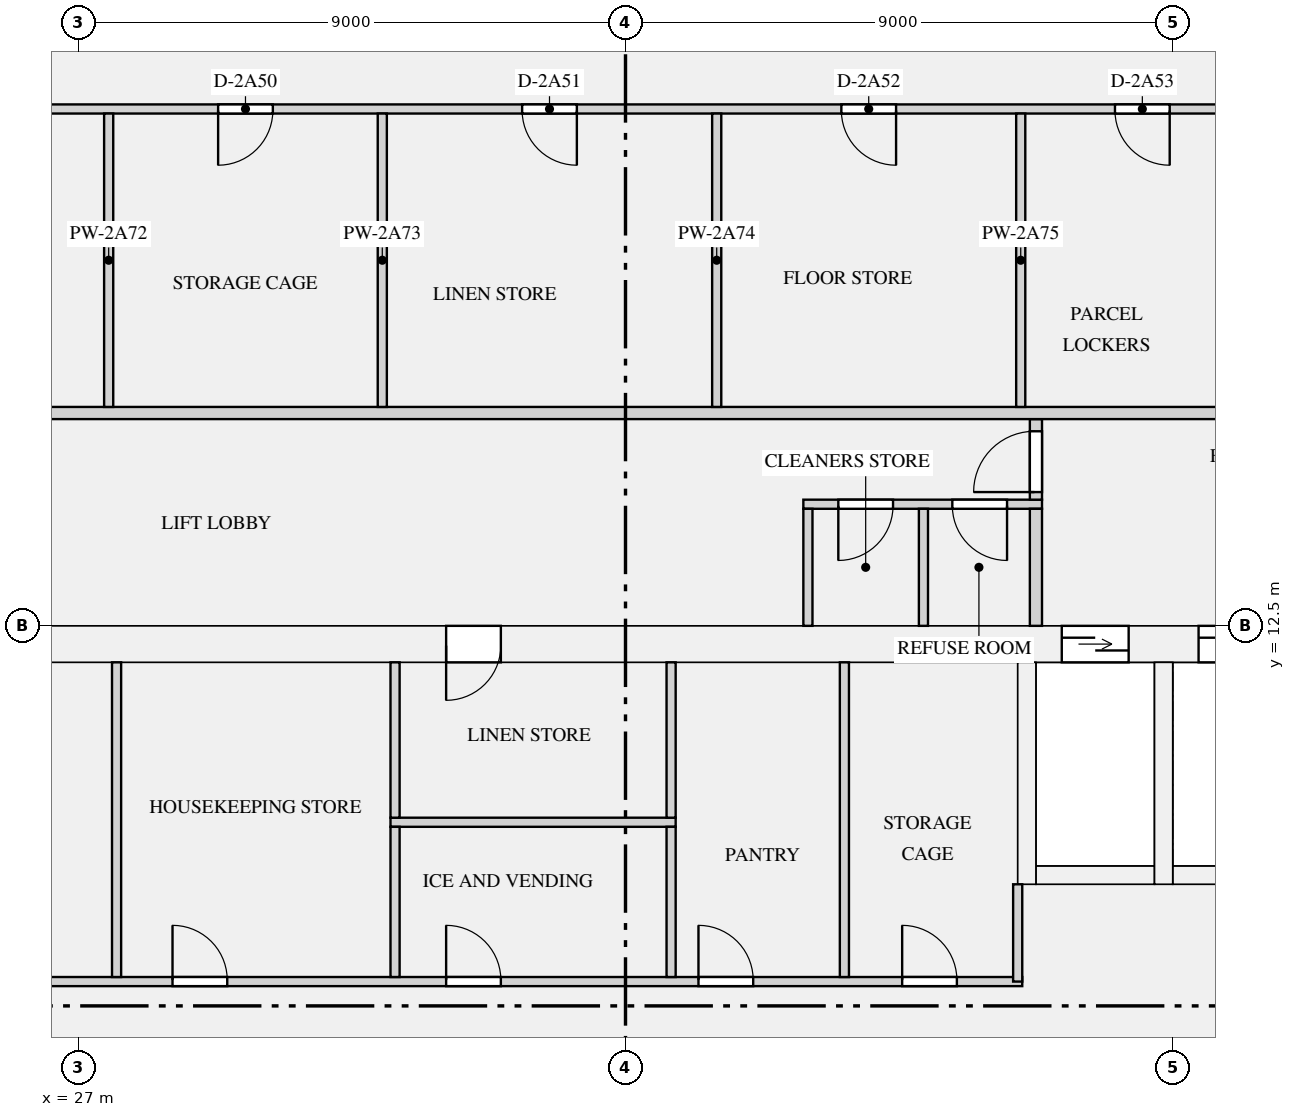
"""IFC4 building model, lengths in metres.
Left out: names, types, materials, properties, quantities, classifications, styles, units other than length and angle.
Written with IfcOpenShell. Run it as: python <this file> out.ifc"""

import sys

from ifc_helpers import new_model, si_unit, direction, frame, frame_2d, origin, place, context, subcontext, project, spatial, rectangle, extrude, element, fill, save


model = new_model("IFC4")
c1 = context("Model", 3, precision=1e-05, world=origin(), true_north=direction((0.0, 1.0)))
c2 = subcontext(c1, "Body", "Model", "MODEL_VIEW")
j1 = project(units=[si_unit("LENGTHUNIT", "METRE"), si_unit("PLANEANGLEUNIT", "RADIAN")], contexts=[c1])
p1 = place(None, origin())
s1 = spatial("IfcSite", under=j1, at=p1, CompositionType="ELEMENT")
p2 = place(p1, origin())
s2 = spatial("IfcBuilding", under=s1, at=p2, CompositionType="ELEMENT")
p3 = place(p2, frame((0.0, 0.0, 83.55)))
s3 = spatial("IfcBuildingStorey", under=s2, at=p3, CompositionType="ELEMENT", Elevation=83.55)
p4 = place(p3, frame((18.8, 12.2, 0.0), z_axis=(0.0, 0.0, 1.0), x_axis=(1.0, 0.0, 0.0)))
e1 = element("IfcWall", 1, at=p4, inside=s3, PredefinedType="SHEAR", context=c2, shape_type="SweptSolid", body=[
    extrude(rectangle(XDim=34.4, YDim=0.6, at=frame_2d((17.2, 0.0))), origin(), (0.0, 0.0, 1.0), 3.15),
])
p5 = place(p4, frame((24.375, 0.0, 0.0)))
e2 = element("IfcOpeningElement", 2, at=p5, cuts=e1, PredefinedType="OPENING", context=c2, shape_type="SweptSolid", body=[
    extrude(rectangle(XDim=1.1, YDim=2.1, at=frame_2d((0.55, 1.05))), frame((0.0, 0.31, 0.0), z_axis=(0.0, -1.0, 0.0), x_axis=(1.0, 0.0, 0.0)), (0.0, 0.0, 1.0), 0.62),
])
p6 = place(p4, frame((26.625, 0.0, 0.0)))
e3 = element("IfcOpeningElement", 3, at=p6, cuts=e1, PredefinedType="OPENING", context=c2, shape_type="SweptSolid", body=[
    extrude(rectangle(XDim=1.1, YDim=2.1, at=frame_2d((0.55, 1.05))), frame((0.0, 0.31, 0.0), z_axis=(0.0, -1.0, 0.0), x_axis=(1.0, 0.0, 0.0)), (0.0, 0.0, 1.0), 0.62),
])
p7 = place(p4, frame((28.875, 0.0, 0.0)))
e4 = element("IfcOpeningElement", 4, at=p7, cuts=e1, PredefinedType="OPENING", context=c2, shape_type="SweptSolid", body=[
    extrude(rectangle(XDim=1.1, YDim=2.1, at=frame_2d((0.55, 1.05))), frame((0.0, 0.31, 0.0), z_axis=(0.0, -1.0, 0.0), x_axis=(1.0, 0.0, 0.0)), (0.0, 0.0, 1.0), 0.62),
])
p8 = place(p4, frame((14.25, 0.0, 0.0)))
e5 = element("IfcOpeningElement", 5, at=p8, cuts=e1, PredefinedType="OPENING", context=c2, shape_type="SweptSolid", body=[
    extrude(rectangle(XDim=0.9, YDim=2.1, at=frame_2d((0.45, 1.05))), frame((0.0, 0.31, 0.0), z_axis=(0.0, -1.0, 0.0), x_axis=(1.0, 0.0, 0.0)), (0.0, 0.0, 1.0), 0.62),
])
p9 = place(p4, frame((1.35, 0.0, 0.0)))
e6 = element("IfcOpeningElement", 6, at=p9, cuts=e1, PredefinedType="OPENING", context=c2, shape_type="SweptSolid", body=[
    extrude(rectangle(XDim=1.2, YDim=2.1, at=frame_2d((0.6, 1.05))), frame((0.0, 0.31, 0.0), z_axis=(0.0, -1.0, 0.0), x_axis=(1.0, 0.0, 0.0)), (0.0, 0.0, 1.0), 0.62),
])
p10 = place(p4, frame((31.85, 0.0, 0.0)))
e7 = element("IfcOpeningElement", 7, at=p10, cuts=e1, PredefinedType="OPENING", context=c2, shape_type="SweptSolid", body=[
    extrude(rectangle(XDim=1.2, YDim=2.1, at=frame_2d((0.6, 1.05))), frame((0.0, 0.31, 0.0), z_axis=(0.0, -1.0, 0.0), x_axis=(1.0, 0.0, 0.0)), (0.0, 0.0, 1.0), 0.62),
])
p11 = place(p3, frame((42.75, 8.4, 0.0), z_axis=(0.0, 0.0, 1.0), x_axis=(1.0, 0.0, 0.0)))
e8 = element("IfcWall", 8, at=p11, inside=s3, PredefinedType="SHEAR", context=c2, shape_type="SweptSolid", body=[
    extrude(rectangle(XDim=1.95, YDim=0.3, at=frame_2d((0.975, 0.0))), origin(), (0.0, 0.0, 1.0), 3.15),
])
p12 = place(p3, frame((42.6, 8.25, 0.0), z_axis=(0.0, 0.0, 1.0), x_axis=(0.0, 1.0, 0.0)))
e9 = element("IfcWall", 9, at=p12, inside=s3, PredefinedType="SHEAR", context=c2, shape_type="SweptSolid", body=[
    extrude(rectangle(XDim=3.65, YDim=0.3, at=frame_2d((1.825, 0.0))), origin(), (0.0, 0.0, 1.0), 3.15),
])
p13 = place(p3, frame((45.0, 8.4, 0.0), z_axis=(0.0, 0.0, 1.0), x_axis=(1.0, 0.0, 0.0)))
e10 = element("IfcWall", 10, at=p13, inside=s3, PredefinedType="SHEAR", context=c2, shape_type="SweptSolid", body=[
    extrude(rectangle(XDim=1.95, YDim=0.3, at=frame_2d((0.975, 0.0))), origin(), (0.0, 0.0, 1.0), 3.15),
])
p14 = place(p3, frame((44.85, 8.25, 0.0), z_axis=(0.0, 0.0, 1.0), x_axis=(0.0, 1.0, 0.0)))
e11 = element("IfcWall", 11, at=p14, inside=s3, PredefinedType="SHEAR", context=c2, shape_type="SweptSolid", body=[
    extrude(rectangle(XDim=3.65, YDim=0.3, at=frame_2d((1.825, 0.0))), origin(), (0.0, 0.0, 1.0), 3.15),
])
p15 = place(p3, frame((22.725, 6.65, 0.0), z_axis=(0.0, 0.0, 1.0), x_axis=(1.0, 0.0, 0.0)))
e12 = element("IfcWall", 12, at=p15, inside=s3, PredefinedType="PARTITIONING", context=c2, shape_type="SweptSolid", body=[
    extrude(rectangle(XDim=19.8, YDim=0.15, at=frame_2d((9.9, 0.0))), origin(), (0.0, 0.0, 1.0), 2.83),
])
p16 = place(p15, frame((0.825, 0.0, 0.0)))
e13 = element("IfcOpeningElement", 13, at=p16, cuts=e12, PredefinedType="OPENING", context=c2, shape_type="SweptSolid", body=[
    extrude(rectangle(XDim=0.9, YDim=2.1, at=frame_2d((0.45, 1.05))), frame((0.0, 0.085, 0.0), z_axis=(0.0, -1.0, 0.0), x_axis=(1.0, 0.0, 0.0)), (0.0, 0.0, 1.0), 0.17),
])
p17 = place(p15, frame((5.825, 0.0, 0.0)))
e14 = element("IfcOpeningElement", 14, at=p17, cuts=e12, PredefinedType="OPENING", context=c2, shape_type="SweptSolid", body=[
    extrude(rectangle(XDim=0.9, YDim=2.1, at=frame_2d((0.45, 1.05))), frame((0.0, 0.085, 0.0), z_axis=(0.0, -1.0, 0.0), x_axis=(1.0, 0.0, 0.0)), (0.0, 0.0, 1.0), 0.17),
])
p18 = place(p15, frame((10.325, 0.0, 0.0)))
e15 = element("IfcOpeningElement", 15, at=p18, cuts=e12, PredefinedType="OPENING", context=c2, shape_type="SweptSolid", body=[
    extrude(rectangle(XDim=0.9, YDim=2.1, at=frame_2d((0.45, 1.05))), frame((0.0, 0.085, 0.0), z_axis=(0.0, -1.0, 0.0), x_axis=(1.0, 0.0, 0.0)), (0.0, 0.0, 1.0), 0.17),
])
p19 = place(p15, frame((14.475, 0.0, 0.0)))
e16 = element("IfcOpeningElement", 16, at=p19, cuts=e12, PredefinedType="OPENING", context=c2, shape_type="SweptSolid", body=[
    extrude(rectangle(XDim=0.9, YDim=2.1, at=frame_2d((0.45, 1.05))), frame((0.0, 0.085, 0.0), z_axis=(0.0, -1.0, 0.0), x_axis=(1.0, 0.0, 0.0)), (0.0, 0.0, 1.0), 0.17),
])
p20 = place(p15, frame((17.825, 0.0, 0.0)))
e17 = element("IfcOpeningElement", 17, at=p20, cuts=e12, PredefinedType="OPENING", context=c2, shape_type="SweptSolid", body=[
    extrude(rectangle(XDim=0.9, YDim=2.1, at=frame_2d((0.45, 1.05))), frame((0.0, 0.085, 0.0), z_axis=(0.0, -1.0, 0.0), x_axis=(1.0, 0.0, 0.0)), (0.0, 0.0, 1.0), 0.17),
])
p21 = place(p3, frame((32.135, 9.27, 0.0), z_axis=(0.0, 0.0, 1.0), x_axis=(1.0, 0.0, 0.0)))
e18 = element("IfcWall", 18, at=p21, inside=s3, PredefinedType="PARTITIONING", context=c2, shape_type="SweptSolid", body=[
    extrude(rectangle(XDim=4.69, YDim=0.15, at=frame_2d((2.345, 0.0))), origin(), (0.0, 0.0, 1.0), 2.83),
])
p22 = place(p3, frame((38.925, 14.5, 0.0), z_axis=(0.0, 0.0, 1.0), x_axis=(1.0, 0.0, 0.0)))
e19 = element("IfcWall", 19, at=p22, inside=s3, PredefinedType="PARTITIONING", context=c2, shape_type="SweptSolid", body=[
    extrude(rectangle(XDim=3.925, YDim=0.15, at=frame_2d((1.962, 0.0))), origin(), (0.0, 0.0, 1.0), 2.83),
])
p23 = place(p22, frame((0.575, 0.0, 0.0)))
e20 = element("IfcOpeningElement", 20, at=p23, cuts=e19, PredefinedType="OPENING", context=c2, shape_type="SweptSolid", body=[
    extrude(rectangle(XDim=0.9, YDim=2.1, at=frame_2d((0.45, 1.05))), frame((0.0, 0.085, 0.0), z_axis=(0.0, -1.0, 0.0), x_axis=(1.0, 0.0, 0.0)), (0.0, 0.0, 1.0), 0.17),
])
p24 = place(p22, frame((2.45, 0.0, 0.0)))
e21 = element("IfcOpeningElement", 21, at=p24, cuts=e19, PredefinedType="OPENING", context=c2, shape_type="SweptSolid", body=[
    extrude(rectangle(XDim=0.9, YDim=2.1, at=frame_2d((0.45, 1.05))), frame((0.0, 0.085, 0.0), z_axis=(0.0, -1.0, 0.0), x_axis=(1.0, 0.0, 0.0)), (0.0, 0.0, 1.0), 0.17),
])
p25 = place(p3, frame((42.45, 6.65, 0.0), z_axis=(0.0, 0.0, 1.0), x_axis=(0.0, 1.0, 0.0)))
e22 = element("IfcWall", 22, at=p25, inside=s3, PredefinedType="PARTITIONING", context=c2, shape_type="SweptSolid", body=[
    extrude(rectangle(XDim=1.6, YDim=0.15, at=frame_2d((0.8, 0.0))), origin(), (0.0, 0.0, 1.0), 2.83),
])
p26 = place(p3, frame((27.63, 6.725, 0.0), z_axis=(0.0, 0.0, 1.0), x_axis=(0.0, 1.0, 0.0)))
e23 = element("IfcWall", 23, at=p26, inside=s3, PredefinedType="PARTITIONING", context=c2, shape_type="SweptSolid", body=[
    extrude(rectangle(XDim=5.175, YDim=0.15, at=frame_2d((2.587, 0.0))), origin(), (0.0, 0.0, 1.0), 2.83),
])
for number, where, z_axis, x_axis in (
    (24, (32.21, 6.725, 0.0), (0.0, 0.0, 1.0), (0.0, 1.0, 0.0)),
    (25, (36.75, 6.725, 0.0), (0.0, 0.0, 1.0), (0.0, 1.0, 0.0)),
):
    element("IfcWall", number, at=place(p3, frame(where, z_axis=z_axis, x_axis=x_axis)), inside=s3, PredefinedType="PARTITIONING", context=c2, shape_type="SweptSolid", body=[
        extrude(rectangle(XDim=2.47, YDim=0.15, at=frame_2d((1.235, 0.0))), origin(), (0.0, 0.0, 1.0), 2.83),
    ])
p27 = place(p3, frame((39.6, 6.725, 0.0), z_axis=(0.0, 0.0, 1.0), x_axis=(0.0, 1.0, 0.0)))
e26 = element("IfcWall", 26, at=p27, inside=s3, PredefinedType="PARTITIONING", context=c2, shape_type="SweptSolid", body=[
    extrude(rectangle(XDim=5.175, YDim=0.15, at=frame_2d((2.587, 0.0))), origin(), (0.0, 0.0, 1.0), 2.83),
])
for number, where, z_axis, x_axis in (
    (27, (32.21, 9.345, 0.0), (0.0, 0.0, 1.0), (0.0, 1.0, 0.0)),
    (28, (36.75, 9.345, 0.0), (0.0, 0.0, 1.0), (0.0, 1.0, 0.0)),
):
    element("IfcWall", number, at=place(p3, frame(where, z_axis=z_axis, x_axis=x_axis)), inside=s3, PredefinedType="PARTITIONING", context=c2, shape_type="SweptSolid", body=[
        extrude(rectangle(XDim=2.555, YDim=0.15, at=frame_2d((1.277, 0.0))), origin(), (0.0, 0.0, 1.0), 2.83),
    ])
for number, where, z_axis, x_axis in (
    (29, (39.0, 12.5, 0.0), (0.0, 0.0, 1.0), (0.0, 1.0, 0.0)),
    (30, (40.9, 12.5, 0.0), (0.0, 0.0, 1.0), (0.0, 1.0, 0.0)),
):
    element("IfcWall", number, at=place(p3, frame(where, z_axis=z_axis, x_axis=x_axis)), inside=s3, PredefinedType="PARTITIONING", context=c2, shape_type="SweptSolid", body=[
        extrude(rectangle(XDim=1.925, YDim=0.15, at=frame_2d((0.962, 0.0))), origin(), (0.0, 0.0, 1.0), 2.83),
    ])
p28 = place(p3, frame((42.75, 12.5, 0.0), z_axis=(0.0, 0.0, 1.0), x_axis=(0.0, 1.0, 0.0)))
e31 = element("IfcWall", 31, at=p28, inside=s3, PredefinedType="PARTITIONING", context=c2, shape_type="SweptSolid", body=[
    extrude(rectangle(XDim=1.925, YDim=0.2, at=frame_2d((0.962, 0.0))), origin(), (0.0, 0.0, 1.0), 2.83),
])
p29 = place(p3, frame((42.75, 14.575, 0.0), z_axis=(0.0, 0.0, 1.0), x_axis=(0.0, 1.0, 0.0)))
e32 = element("IfcWall", 32, at=p29, inside=s3, PredefinedType="PARTITIONING", context=c2, shape_type="SweptSolid", body=[
    extrude(rectangle(XDim=1.325, YDim=0.2, at=frame_2d((0.663, 0.0))), origin(), (0.0, 0.0, 1.0), 2.83),
])
p30 = place(p29, frame((0.125, 0.0, 0.0)))
e33 = element("IfcOpeningElement", 33, at=p30, cuts=e32, PredefinedType="OPENING", context=c2, shape_type="SweptSolid", body=[
    extrude(rectangle(XDim=1.0, YDim=2.1, at=frame_2d((0.5, 1.05))), frame((0.0, 0.11, 0.0), z_axis=(0.0, -1.0, 0.0), x_axis=(1.0, 0.0, 0.0)), (0.0, 0.0, 1.0), 0.22),
])
p31 = place(p3, frame((20.925, 21.0, 0.0), z_axis=(0.0, 0.0, 1.0), x_axis=(1.0, 0.0, 0.0)))
e34 = element("IfcWall", 34, at=p31, inside=s3, PredefinedType="PARTITIONING", context=c2, shape_type="SweptSolid", body=[
    extrude(rectangle(XDim=30.15, YDim=0.15, at=frame_2d((15.075, 0.0))), origin(), (0.0, 0.0, 1.0), 2.83),
])
p32 = place(p31, frame((2.875, 0.0, 0.0)))
e35 = element("IfcOpeningElement", 35, at=p32, cuts=e34, PredefinedType="OPENING", context=c2, shape_type="SweptSolid", body=[
    extrude(rectangle(XDim=0.9, YDim=2.1, at=frame_2d((0.45, 1.05))), frame((0.0, 0.085, 0.0), z_axis=(0.0, -1.0, 0.0), x_axis=(1.0, 0.0, 0.0)), (0.0, 0.0, 1.0), 0.17),
])
p33 = place(p31, frame((8.375, 0.0, 0.0)))
e36 = element("IfcOpeningElement", 36, at=p33, cuts=e34, PredefinedType="OPENING", context=c2, shape_type="SweptSolid", body=[
    extrude(rectangle(XDim=0.9, YDim=2.1, at=frame_2d((0.45, 1.05))), frame((0.0, 0.085, 0.0), z_axis=(0.0, -1.0, 0.0), x_axis=(1.0, 0.0, 0.0)), (0.0, 0.0, 1.0), 0.17),
])
p34 = place(p31, frame((13.375, 0.0, 0.0)))
e37 = element("IfcOpeningElement", 37, at=p34, cuts=e34, PredefinedType="OPENING", context=c2, shape_type="SweptSolid", body=[
    extrude(rectangle(XDim=0.9, YDim=2.1, at=frame_2d((0.45, 1.05))), frame((0.0, 0.085, 0.0), z_axis=(0.0, -1.0, 0.0), x_axis=(1.0, 0.0, 0.0)), (0.0, 0.0, 1.0), 0.17),
])
p35 = place(p31, frame((18.625, 0.0, 0.0)))
e38 = element("IfcOpeningElement", 38, at=p35, cuts=e34, PredefinedType="OPENING", context=c2, shape_type="SweptSolid", body=[
    extrude(rectangle(XDim=0.9, YDim=2.1, at=frame_2d((0.45, 1.05))), frame((0.0, 0.085, 0.0), z_axis=(0.0, -1.0, 0.0), x_axis=(1.0, 0.0, 0.0)), (0.0, 0.0, 1.0), 0.17),
])
p36 = place(p31, frame((23.125, 0.0, 0.0)))
e39 = element("IfcOpeningElement", 39, at=p36, cuts=e34, PredefinedType="OPENING", context=c2, shape_type="SweptSolid", body=[
    extrude(rectangle(XDim=0.9, YDim=2.1, at=frame_2d((0.45, 1.05))), frame((0.0, 0.085, 0.0), z_axis=(0.0, -1.0, 0.0), x_axis=(1.0, 0.0, 0.0)), (0.0, 0.0, 1.0), 0.17),
])
p37 = place(p3, frame((17.9, 16.0, 0.0), z_axis=(0.0, 0.0, 1.0), x_axis=(1.0, 0.0, 0.0)))
e40 = element("IfcWall", 40, at=p37, inside=s3, PredefinedType="PARTITIONING", context=c2, shape_type="SweptSolid", body=[
    extrude(rectangle(XDim=36.2, YDim=0.2, at=frame_2d((18.1, 0.0))), origin(), (0.0, 0.0, 1.0), 2.83),
])
p38 = place(p37, frame((0.9, 0.0, 0.0)))
e41 = element("IfcOpeningElement", 41, at=p38, cuts=e40, PredefinedType="OPENING", context=c2, shape_type="SweptSolid", body=[
    extrude(rectangle(XDim=1.4, YDim=2.1, at=frame_2d((0.7, 1.05))), frame((0.0, 0.11, 0.0), z_axis=(0.0, -1.0, 0.0), x_axis=(1.0, 0.0, 0.0)), (0.0, 0.0, 1.0), 0.22),
])
p39 = place(p37, frame((33.9, 0.0, 0.0)))
e42 = element("IfcOpeningElement", 42, at=p39, cuts=e40, PredefinedType="OPENING", context=c2, shape_type="SweptSolid", body=[
    extrude(rectangle(XDim=1.4, YDim=2.1, at=frame_2d((0.7, 1.05))), frame((0.0, 0.11, 0.0), z_axis=(0.0, -1.0, 0.0), x_axis=(1.0, 0.0, 0.0)), (0.0, 0.0, 1.0), 0.22),
])
for number, where, z_axis, x_axis in (
    (43, (27.5, 16.1, 0.0), (0.0, 0.0, 1.0), (0.0, 1.0, 0.0)),
    (44, (32.0, 16.1, 0.0), (0.0, 0.0, 1.0), (0.0, 1.0, 0.0)),
    (45, (37.5, 16.1, 0.0), (0.0, 0.0, 1.0), (0.0, 1.0, 0.0)),
    (46, (42.5, 16.1, 0.0), (0.0, 0.0, 1.0), (0.0, 1.0, 0.0)),
):
    element("IfcWall", number, at=place(p3, frame(where, z_axis=z_axis, x_axis=x_axis)), inside=s3, PredefinedType="PARTITIONING", context=c2, shape_type="SweptSolid", body=[
        extrude(rectangle(XDim=4.825, YDim=0.15, at=frame_2d((2.413, 0.0))), origin(), (0.0, 0.0, 1.0), 2.83),
    ])
p40 = place(p5, origin())
e47 = element("IfcDoor", 47, at=p40, inside=s3, OperationType="DOUBLE_DOOR_SLIDING", PredefinedType="DOOR", context=c2, shape_type="SweptSolid", body=[
    extrude(rectangle(XDim=1.1, YDim=2.1, at=frame_2d((0.55, 1.05))), frame((0.0, 0.025, 0.0), z_axis=(0.0, -1.0, 0.0), x_axis=(1.0, 0.0, 0.0)), (0.0, 0.0, 1.0), 0.05),
])
fill(e2, e47)
p41 = place(p6, origin())
e48 = element("IfcDoor", 48, at=p41, inside=s3, OperationType="DOUBLE_DOOR_SLIDING", PredefinedType="DOOR", context=c2, shape_type="SweptSolid", body=[
    extrude(rectangle(XDim=1.1, YDim=2.1, at=frame_2d((0.55, 1.05))), frame((0.0, 0.025, 0.0), z_axis=(0.0, -1.0, 0.0), x_axis=(1.0, 0.0, 0.0)), (0.0, 0.0, 1.0), 0.05),
])
fill(e3, e48)
p42 = place(p23, frame((0.9, 0.0, 0.0), z_axis=(0.0, 0.0, 1.0), x_axis=(-1.0, 0.0, 0.0)))
e49 = element("IfcDoor", 49, at=p42, inside=s3, OperationType="SINGLE_SWING_RIGHT", PredefinedType="DOOR", context=c2, shape_type="SweptSolid", body=[
    extrude(rectangle(XDim=0.9, YDim=2.1, at=frame_2d((0.45, 1.05))), frame((0.0, 0.025, 0.0), z_axis=(0.0, -1.0, 0.0), x_axis=(1.0, 0.0, 0.0)), (0.0, 0.0, 1.0), 0.05),
])
fill(e20, e49)
p43 = place(p24, frame((0.9, 0.0, 0.0), z_axis=(0.0, 0.0, 1.0), x_axis=(-1.0, 0.0, 0.0)))
e50 = element("IfcDoor", 50, at=p43, inside=s3, OperationType="SINGLE_SWING_LEFT", PredefinedType="DOOR", context=c2, shape_type="SweptSolid", body=[
    extrude(rectangle(XDim=0.9, YDim=2.1, at=frame_2d((0.45, 1.05))), frame((0.0, 0.025, 0.0), z_axis=(0.0, -1.0, 0.0), x_axis=(1.0, 0.0, 0.0)), (0.0, 0.0, 1.0), 0.05),
])
fill(e21, e50)
p44 = place(p17, origin())
e51 = element("IfcDoor", 51, at=p44, inside=s3, OperationType="SINGLE_SWING_LEFT", PredefinedType="DOOR", context=c2, shape_type="SweptSolid", body=[
    extrude(rectangle(XDim=0.9, YDim=2.1, at=frame_2d((0.45, 1.05))), frame((0.0, 0.025, 0.0), z_axis=(0.0, -1.0, 0.0), x_axis=(1.0, 0.0, 0.0)), (0.0, 0.0, 1.0), 0.05),
])
fill(e14, e51)
p45 = place(p18, origin())
e52 = element("IfcDoor", 52, at=p45, inside=s3, OperationType="SINGLE_SWING_LEFT", PredefinedType="DOOR", context=c2, shape_type="SweptSolid", body=[
    extrude(rectangle(XDim=0.9, YDim=2.1, at=frame_2d((0.45, 1.05))), frame((0.0, 0.025, 0.0), z_axis=(0.0, -1.0, 0.0), x_axis=(1.0, 0.0, 0.0)), (0.0, 0.0, 1.0), 0.05),
])
fill(e15, e52)
p46 = place(p8, frame((0.9, 0.0, 0.0), z_axis=(0.0, 0.0, 1.0), x_axis=(-1.0, 0.0, 0.0)))
e53 = element("IfcDoor", 53, at=p46, inside=s3, OperationType="SINGLE_SWING_RIGHT", PredefinedType="DOOR", context=c2, shape_type="SweptSolid", body=[
    extrude(rectangle(XDim=0.9, YDim=2.1, at=frame_2d((0.45, 1.05))), frame((0.0, 0.025, 0.0), z_axis=(0.0, -1.0, 0.0), x_axis=(1.0, 0.0, 0.0)), (0.0, 0.0, 1.0), 0.05),
])
fill(e5, e53)
p47 = place(p19, origin())
e54 = element("IfcDoor", 54, at=p47, inside=s3, OperationType="SINGLE_SWING_LEFT", PredefinedType="DOOR", context=c2, shape_type="SweptSolid", body=[
    extrude(rectangle(XDim=0.9, YDim=2.1, at=frame_2d((0.45, 1.05))), frame((0.0, 0.025, 0.0), z_axis=(0.0, -1.0, 0.0), x_axis=(1.0, 0.0, 0.0)), (0.0, 0.0, 1.0), 0.05),
])
fill(e16, e54)
p48 = place(p20, origin())
e55 = element("IfcDoor", 55, at=p48, inside=s3, OperationType="SINGLE_SWING_LEFT", PredefinedType="DOOR", context=c2, shape_type="SweptSolid", body=[
    extrude(rectangle(XDim=0.9, YDim=2.1, at=frame_2d((0.45, 1.05))), frame((0.0, 0.025, 0.0), z_axis=(0.0, -1.0, 0.0), x_axis=(1.0, 0.0, 0.0)), (0.0, 0.0, 1.0), 0.05),
])
fill(e17, e55)
p49 = place(p30, origin())
e56 = element("IfcDoor", 56, at=p49, inside=s3, OperationType="SINGLE_SWING_LEFT", PredefinedType="DOOR", context=c2, shape_type="SweptSolid", body=[
    extrude(rectangle(XDim=1.0, YDim=2.1, at=frame_2d((0.5, 1.05))), frame((0.0, 0.025, 0.0), z_axis=(0.0, -1.0, 0.0), x_axis=(1.0, 0.0, 0.0)), (0.0, 0.0, 1.0), 0.05),
])
fill(e33, e56)
p50 = place(p33, frame((0.9, 0.0, 0.0), z_axis=(0.0, 0.0, 1.0), x_axis=(-1.0, 0.0, 0.0)))
e57 = element("IfcDoor", 57, at=p50, inside=s3, OperationType="SINGLE_SWING_RIGHT", PredefinedType="DOOR", context=c2, shape_type="SweptSolid", body=[
    extrude(rectangle(XDim=0.9, YDim=2.1, at=frame_2d((0.45, 1.05))), frame((0.0, 0.025, 0.0), z_axis=(0.0, -1.0, 0.0), x_axis=(1.0, 0.0, 0.0)), (0.0, 0.0, 1.0), 0.05),
])
fill(e36, e57)
p51 = place(p34, frame((0.9, 0.0, 0.0), z_axis=(0.0, 0.0, 1.0), x_axis=(-1.0, 0.0, 0.0)))
e58 = element("IfcDoor", 58, at=p51, inside=s3, OperationType="SINGLE_SWING_LEFT", PredefinedType="DOOR", context=c2, shape_type="SweptSolid", body=[
    extrude(rectangle(XDim=0.9, YDim=2.1, at=frame_2d((0.45, 1.05))), frame((0.0, 0.025, 0.0), z_axis=(0.0, -1.0, 0.0), x_axis=(1.0, 0.0, 0.0)), (0.0, 0.0, 1.0), 0.05),
])
fill(e37, e58)
p52 = place(p35, frame((0.9, 0.0, 0.0), z_axis=(0.0, 0.0, 1.0), x_axis=(-1.0, 0.0, 0.0)))
e59 = element("IfcDoor", 59, at=p52, inside=s3, OperationType="SINGLE_SWING_LEFT", PredefinedType="DOOR", context=c2, shape_type="SweptSolid", body=[
    extrude(rectangle(XDim=0.9, YDim=2.1, at=frame_2d((0.45, 1.05))), frame((0.0, 0.025, 0.0), z_axis=(0.0, -1.0, 0.0), x_axis=(1.0, 0.0, 0.0)), (0.0, 0.0, 1.0), 0.05),
])
fill(e38, e59)
p53 = place(p36, frame((0.9, 0.0, 0.0), z_axis=(0.0, 0.0, 1.0), x_axis=(-1.0, 0.0, 0.0)))
e60 = element("IfcDoor", 60, at=p53, inside=s3, OperationType="SINGLE_SWING_LEFT", PredefinedType="DOOR", context=c2, shape_type="SweptSolid", body=[
    extrude(rectangle(XDim=0.9, YDim=2.1, at=frame_2d((0.45, 1.05))), frame((0.0, 0.025, 0.0), z_axis=(0.0, -1.0, 0.0), x_axis=(1.0, 0.0, 0.0)), (0.0, 0.0, 1.0), 0.05),
])
fill(e39, e60)
save(model, sys.argv[1])
